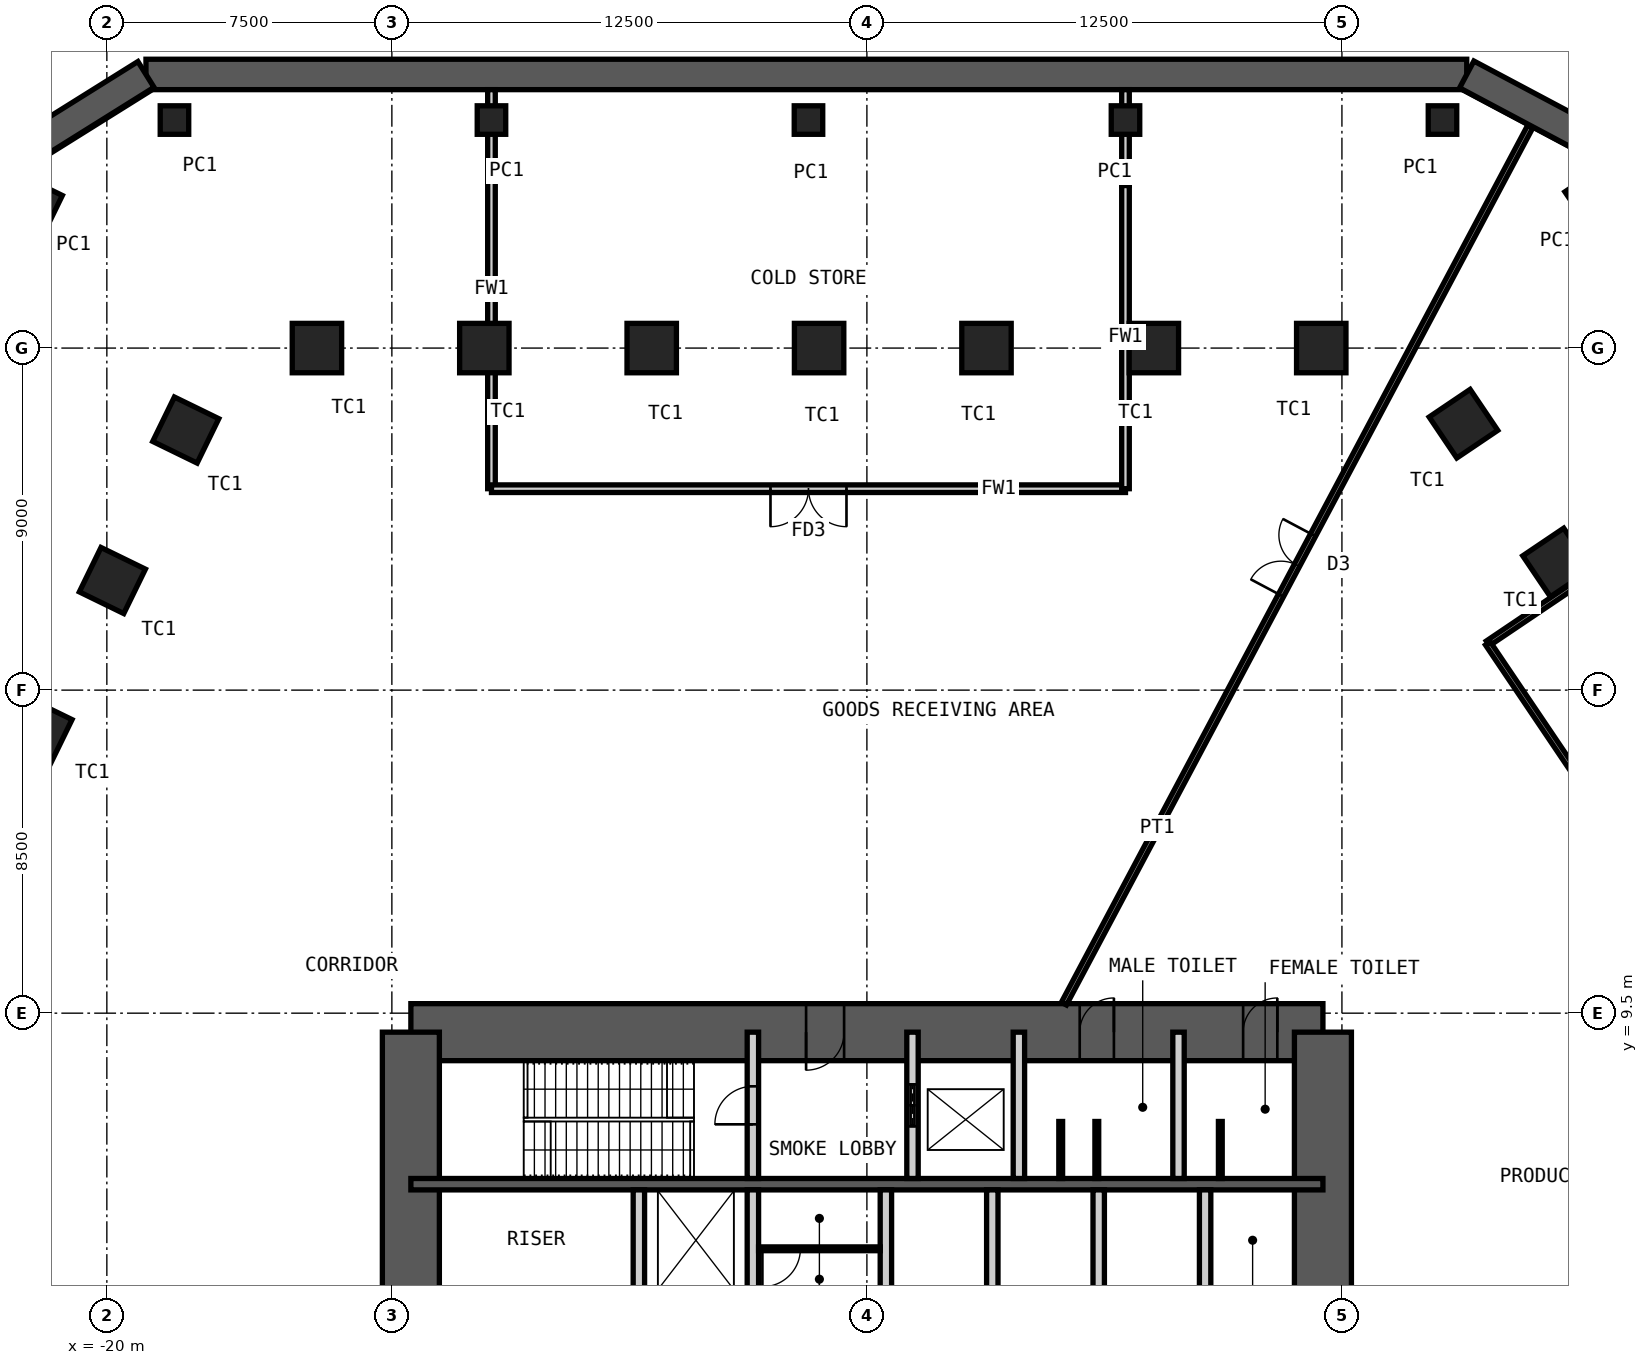
"""IFC4 building model, lengths in metres.
Left out: names, types, materials, properties, quantities, classifications, styles, units other than length and angle.
Written with IfcOpenShell. Run it as: python <this file> out.ifc"""

import sys

from ifc_helpers import new_model, si_unit, direction, frame, frame_2d, origin, origin_2d, place, context, subcontext, project, spatial, rectangle, hollow_rectangle, extrude, element, fill, save


model = new_model("IFC4")
c1 = context("Model", 3, precision=1e-05, world=origin(), true_north=direction((0.0, 1.0)))
c2 = subcontext(c1, "Body", "Model", "MODEL_VIEW")
j1 = project(units=[si_unit("LENGTHUNIT", "METRE"), si_unit("PLANEANGLEUNIT", "RADIAN")], contexts=[c1])
p1 = place(None, origin())
s1 = spatial("IfcSite", under=j1, at=p1, CompositionType="ELEMENT")
p2 = place(p1, origin())
s2 = spatial("IfcBuilding", under=s1, at=p2, CompositionType="ELEMENT")
p3 = place(p2, frame((0.0, 0.0, -6.0)))
s3 = spatial("IfcBuildingStorey", under=s2, at=p3, CompositionType="ELEMENT", Elevation=-6.0)
p4 = place(p3, frame((-18.97, 34.2, 0.0), z_axis=(0.0, 0.0, 1.0), x_axis=(1.0, 0.0, 0.0)))
e1 = element("IfcWall", 1, at=p4, inside=s3, PredefinedType="SHEAR", context=c2, shape_type="SweptSolid", body=[
    extrude(rectangle(XDim=34.755, YDim=0.8, at=frame_2d((17.377, 0.0))), origin(), (0.0, 0.0, 1.0), 6.0),
])
p5 = place(p3, frame((15.784, 34.2, 0.0), z_axis=(0.0, 0.0, 1.0), x_axis=(0.882948599748, -0.469469669099, 0.0)))
e2 = element("IfcWall", 2, at=p5, inside=s3, PredefinedType="SHEAR", context=c2, shape_type="SweptSolid", body=[
    extrude(rectangle(XDim=4.238, YDim=0.8, at=frame_2d((2.119, 0.0))), origin(), (0.0, 0.0, 1.0), 6.0),
])
p6 = place(p3, frame((-22.423, 32.043, 0.0), z_axis=(0.0, 0.0, 1.0), x_axis=(0.848065686315, 0.529891113055, 0.0)))
e3 = element("IfcWall", 3, at=p6, inside=s3, PredefinedType="SHEAR", context=c2, shape_type="SweptSolid", body=[
    extrude(rectangle(XDim=4.071, YDim=0.8, at=frame_2d((2.035, 0.0))), origin(), (0.0, 0.0, 1.0), 6.0),
])
for number, where, z_axis, x_axis in (
    (4, (-14.471, 27.0, 0.0), (0.0, 0.0, 1.0), (-1.0, 0.0, 0.0)),
    (5, (-10.067, 27.0, 0.0), (0.0, 0.0, 1.0), (-1.0, 0.0, 0.0)),
    (6, (-5.662, 27.0, 0.0), (0.0, 0.0, 1.0), (-1.0, 0.0, 0.0)),
    (7, (-1.258, 27.0, 0.0), (0.0, 0.0, 1.0), (-1.0, 0.0, 0.0)),
    (8, (3.147, 27.0, 0.0), (0.0, 0.0, 1.0), (-1.0, 0.0, 0.0)),
    (9, (7.552, 27.0, 0.0), (0.0, 0.0, 1.0), (-1.0, 0.0, 0.0)),
    (10, (11.956, 27.0, 0.0), (0.0, 0.0, 1.0), (-1.0, 0.0, 0.0)),
    (11, (15.698, 25.01, 0.0), (0.0, 0.0, 1.0), (-0.559, 0.829, 0.0)),
    (12, (18.161, 21.359, 0.0), (0.0, 0.0, 1.0), (-0.559, 0.829, 0.0)),
    (13, (-21.785, 16.925, 0.0), (0.0, 0.0, 1.0), (-0.438, -0.899, 0.0)),
    (14, (-19.854, 20.884, 0.0), (0.0, 0.0, 1.0), (-0.438, -0.899, 0.0)),
    (15, (-17.924, 24.843, 0.0), (0.0, 0.0, 1.0), (-0.438, -0.899, 0.0)),
):
    element("IfcColumn", number, at=place(p3, frame(where, z_axis=z_axis, x_axis=x_axis)), inside=s3, PredefinedType="COLUMN", context=c2, shape_type="SweptSolid", body=[
        extrude(hollow_rectangle(XDim=1.3, YDim=1.3, WallThickness=0.1, at=origin_2d()), origin(), (0.0, 0.0, 1.0), 6.0),
    ])
for number, where, z_axis, x_axis in (
    (16, (-18.221, 33.0, 0.0), (0.0, 0.0, 1.0), (-1.0, 0.0, 0.0)),
    (17, (-9.879, 33.0, 0.0), (0.0, 0.0, 1.0), (-1.0, 0.0, 0.0)),
    (18, (-1.537, 33.0, 0.0), (0.0, 0.0, 1.0), (-1.0, 0.0, 0.0)),
    (19, (6.805, 33.0, 0.0), (0.0, 0.0, 1.0), (-1.0, 0.0, 0.0)),
    (20, (18.888, 31.01, 0.0), (0.0, 0.0, 1.0), (-0.559, 0.829, 0.0)),
    (21, (15.146, 33.0, 0.0), (0.0, 0.0, 1.0), (-1.0, 0.0, 0.0)),
    (22, (-21.673, 30.843, 0.0), (0.0, 0.0, 1.0), (-0.438, -0.899, 0.0)),
):
    element("IfcColumn", number, at=place(p3, frame(where, z_axis=z_axis, x_axis=x_axis)), inside=s3, PredefinedType="COLUMN", context=c2, shape_type="SweptSolid", body=[
        extrude(hollow_rectangle(XDim=0.75, YDim=0.75, WallThickness=0.036, at=origin_2d()), origin(), (0.0, 0.0, 1.0), 6.0),
    ])
p7 = place(p3, frame((-12.0, 9.0, 0.0), z_axis=(0.0, 0.0, 1.0), x_axis=(1.0, 0.0, 0.0)))
e23 = element("IfcWall", 23, at=p7, inside=s3, PredefinedType="SHEAR", context=c2, shape_type="SweptSolid", body=[
    extrude(rectangle(XDim=24.0, YDim=1.5, at=frame_2d((12.0, 0.0))), origin(), (0.0, 0.0, 1.0), 6.0),
])
p8 = place(p7, frame((10.4, 0.0, 0.0)))
e24 = element("IfcOpeningElement", 24, at=p8, cuts=e23, PredefinedType="OPENING", context=c2, shape_type="SweptSolid", body=[
    extrude(rectangle(XDim=1.0, YDim=2.1, at=frame_2d((0.5, 1.05))), frame((0.0, 0.76, 0.0), z_axis=(0.0, -1.0, 0.0), x_axis=(1.0, 0.0, 0.0)), (0.0, 0.0, 1.0), 1.52),
])
p9 = place(p7, frame((17.6, 0.0, 0.0)))
e25 = element("IfcOpeningElement", 25, at=p9, cuts=e23, PredefinedType="OPENING", context=c2, shape_type="SweptSolid", body=[
    extrude(rectangle(XDim=0.9, YDim=2.1, at=frame_2d((0.45, 1.05))), frame((0.0, 0.76, 0.0), z_axis=(0.0, -1.0, 0.0), x_axis=(1.0, 0.0, 0.0)), (0.0, 0.0, 1.0), 1.52),
])
p10 = place(p7, frame((21.9, 0.0, 0.0)))
e26 = element("IfcOpeningElement", 26, at=p10, cuts=e23, PredefinedType="OPENING", context=c2, shape_type="SweptSolid", body=[
    extrude(rectangle(XDim=0.9, YDim=2.1, at=frame_2d((0.45, 1.05))), frame((0.0, 0.76, 0.0), z_axis=(0.0, -1.0, 0.0), x_axis=(1.0, 0.0, 0.0)), (0.0, 0.0, 1.0), 1.52),
])
p11 = place(p3, frame((12.0, -9.0, 0.0), z_axis=(0.0, 0.0, 1.0), x_axis=(0.0, 1.0, 0.0)))
e27 = element("IfcWall", 27, at=p11, inside=s3, PredefinedType="SHEAR", context=c2, shape_type="SweptSolid", body=[
    extrude(rectangle(XDim=18.0, YDim=1.5, at=frame_2d((9.0, 0.0))), origin(), (0.0, 0.0, 1.0), 6.0),
])
p12 = place(p11, frame((8.1, 0.0, 0.0)))
e28 = element("IfcOpeningElement", 28, at=p12, cuts=e27, PredefinedType="OPENING", context=c2, shape_type="SweptSolid", body=[
    extrude(rectangle(XDim=1.8, YDim=2.1, at=frame_2d((0.9, 1.05))), frame((0.0, 0.76, 0.0), z_axis=(0.0, -1.0, 0.0), x_axis=(1.0, 0.0, 0.0)), (0.0, 0.0, 1.0), 1.52),
])
p13 = place(p3, frame((-12.0, -9.0, 0.0), z_axis=(0.0, 0.0, 1.0), x_axis=(0.0, 1.0, 0.0)))
e29 = element("IfcWall", 29, at=p13, inside=s3, PredefinedType="SHEAR", context=c2, shape_type="SweptSolid", body=[
    extrude(rectangle(XDim=18.0, YDim=1.5, at=frame_2d((9.0, 0.0))), origin(), (0.0, 0.0, 1.0), 6.0),
])
p14 = place(p13, frame((8.1, 0.0, 0.0)))
e30 = element("IfcOpeningElement", 30, at=p14, cuts=e29, PredefinedType="OPENING", context=c2, shape_type="SweptSolid", body=[
    extrude(rectangle(XDim=1.8, YDim=2.1, at=frame_2d((0.9, 1.05))), frame((0.0, 0.76, 0.0), z_axis=(0.0, -1.0, 0.0), x_axis=(1.0, 0.0, 0.0)), (0.0, 0.0, 1.0), 1.52),
])
p15 = place(p3, frame((-12.0, 5.0, 0.0), z_axis=(0.0, 0.0, 1.0), x_axis=(1.0, 0.0, 0.0)))
e31 = element("IfcWall", 31, at=p15, inside=s3, PredefinedType="SHEAR", context=c2, shape_type="SweptSolid", body=[
    extrude(rectangle(XDim=24.0, YDim=0.3, at=frame_2d((12.0, 0.0))), origin(), (0.0, 0.0, 1.0), 6.0),
])
p16 = place(p3, frame((-3.0, 5.15, 0.0), z_axis=(0.0, 0.0, 1.0), x_axis=(0.0, 1.0, 0.0)))
e32 = element("IfcWall", 32, at=p16, inside=s3, PredefinedType="PARTITIONING", context=c2, shape_type="SweptSolid", body=[
    extrude(rectangle(XDim=3.85, YDim=0.3, at=frame_2d((1.925, 0.0))), origin(), (0.0, 0.0, 1.0), 5.78),
])
p17 = place(p16, frame((1.425, 0.0, 0.0)))
e33 = element("IfcOpeningElement", 33, at=p17, cuts=e32, PredefinedType="OPENING", context=c2, shape_type="SweptSolid", body=[
    extrude(rectangle(XDim=1.0, YDim=2.1, at=frame_2d((0.5, 1.05))), frame((0.0, 0.16, 0.0), z_axis=(0.0, -1.0, 0.0), x_axis=(1.0, 0.0, 0.0)), (0.0, 0.0, 1.0), 0.32),
])
p18 = place(p3, frame((1.2, 5.15, 0.0), z_axis=(0.0, 0.0, 1.0), x_axis=(0.0, 1.0, 0.0)))
e34 = element("IfcWall", 34, at=p18, inside=s3, PredefinedType="PARTITIONING", context=c2, shape_type="SweptSolid", body=[
    extrude(rectangle(XDim=3.85, YDim=0.3, at=frame_2d((1.925, 0.0))), origin(), (0.0, 0.0, 1.0), 5.78),
])
p19 = place(p18, frame((1.375, 0.0, 0.0)))
e35 = element("IfcOpeningElement", 35, at=p19, cuts=e34, PredefinedType="OPENING", context=c2, shape_type="SweptSolid", body=[
    extrude(rectangle(XDim=1.1, YDim=2.4, at=frame_2d((0.55, 1.2))), frame((0.0, 0.16, 0.0), z_axis=(0.0, -1.0, 0.0), x_axis=(1.0, 0.0, 0.0)), (0.0, 0.0, 1.0), 0.32),
])
for number, where, z_axis, x_axis in (
    (36, (4.0, 5.15, 0.0), (0.0, 0.0, 1.0), (0.0, 1.0, 0.0)),
    (37, (8.2, 5.15, 0.0), (0.0, 0.0, 1.0), (0.0, 1.0, 0.0)),
):
    element("IfcWall", number, at=place(p3, frame(where, z_axis=z_axis, x_axis=x_axis)), inside=s3, PredefinedType="PARTITIONING", context=c2, shape_type="SweptSolid", body=[
        extrude(rectangle(XDim=3.85, YDim=0.3, at=frame_2d((1.925, 0.0))), origin(), (0.0, 0.0, 1.0), 5.78),
    ])
for number, where, z_axis, x_axis in (
    (38, (-6.0, 2.2, 0.0), (0.0, 0.0, 1.0), (0.0, 1.0, 0.0)),
    (39, (-3.0, 2.2, 0.0), (0.0, 0.0, 1.0), (0.0, 1.0, 0.0)),
    (40, (0.5, 2.2, 0.0), (0.0, 0.0, 1.0), (0.0, 1.0, 0.0)),
    (41, (3.3, 2.2, 0.0), (0.0, 0.0, 1.0), (0.0, 1.0, 0.0)),
    (42, (6.1, 2.2, 0.0), (0.0, 0.0, 1.0), (0.0, 1.0, 0.0)),
    (43, (8.9, 2.2, 0.0), (0.0, 0.0, 1.0), (0.0, 1.0, 0.0)),
):
    element("IfcWall", number, at=place(p3, frame(where, z_axis=z_axis, x_axis=x_axis)), inside=s3, PredefinedType="PARTITIONING", context=c2, shape_type="SweptSolid", body=[
        extrude(rectangle(XDim=2.65, YDim=0.3, at=frame_2d((1.325, 0.0))), origin(), (0.0, 0.0, 1.0), 5.78),
    ])
p20 = place(p3, frame((-2.85, 3.3, 0.0), z_axis=(0.0, 0.0, 1.0), x_axis=(1.0, 0.0, 0.0)))
e44 = element("IfcWall", 44, at=p20, inside=s3, PredefinedType="PARTITIONING", context=c2, shape_type="SweptSolid", body=[
    extrude(rectangle(XDim=3.2, YDim=0.1, at=frame_2d((1.6, 0.0))), origin(), (0.0, 0.0, 1.0), 5.78),
])
p21 = place(p20, frame((0.1, 0.0, 0.0)))
e45 = element("IfcOpeningElement", 45, at=p21, cuts=e44, PredefinedType="OPENING", context=c2, shape_type="SweptSolid", body=[
    extrude(rectangle(XDim=1.0, YDim=2.4, at=frame_2d((0.5, 1.2))), frame((0.0, 0.06, 0.0), z_axis=(0.0, -1.0, 0.0), x_axis=(1.0, 0.0, 0.0)), (0.0, 0.0, 1.0), 0.12),
])
for number, where, z_axis, x_axis in (
    (46, (5.1, 5.15, 0.0), (0.0, 0.0, 1.0), (0.0, 1.0, 0.0)),
    (47, (6.05, 5.15, 0.0), (0.0, 0.0, 1.0), (0.0, 1.0, 0.0)),
    (48, (9.3, 5.15, 0.0), (0.0, 0.0, 1.0), (0.0, 1.0, 0.0)),
):
    element("IfcWall", number, at=place(p3, frame(where, z_axis=z_axis, x_axis=x_axis)), inside=s3, PredefinedType="PARTITIONING", context=c2, shape_type="SweptSolid", body=[
        extrude(rectangle(XDim=1.5, YDim=0.1, at=frame_2d((0.75, 0.0))), origin(), (0.0, 0.0, 1.0), 2.1),
    ])
p22 = place(p3, frame((-9.879, 33.8, 0.0), z_axis=(0.0, 0.0, 1.0), x_axis=(0.0, -1.0, 0.0)))
e49 = element("IfcWall", 49, at=p22, inside=s3, PredefinedType="PARTITIONING", context=c2, shape_type="SweptSolid", body=[
    extrude(rectangle(XDim=10.5, YDim=0.2, at=frame_2d((5.25, 0.0))), origin(), (0.0, 0.0, 1.0), 5.75),
])
p23 = place(p3, frame((6.805, 33.8, 0.0), z_axis=(0.0, 0.0, 1.0), x_axis=(0.0, -1.0, 0.0)))
e50 = element("IfcWall", 50, at=p23, inside=s3, PredefinedType="PARTITIONING", context=c2, shape_type="SweptSolid", body=[
    extrude(rectangle(XDim=0.78, YDim=0.2, at=frame_2d((0.39, 0.0))), origin(), (0.0, 0.0, 1.0), 5.75),
])
p24 = place(p3, frame((-9.879, 23.3, 0.0), z_axis=(0.0, 0.0, 1.0), x_axis=(1.0, 0.0, 0.0)))
e51 = element("IfcWall", 51, at=p24, inside=s3, PredefinedType="PARTITIONING", context=c2, shape_type="SweptSolid", body=[
    extrude(rectangle(XDim=16.684, YDim=0.2, at=frame_2d((8.342, 0.0))), origin(), (0.0, 0.0, 1.0), 5.75),
])
p25 = place(p24, frame((7.342, 0.0, 0.0)))
e52 = element("IfcOpeningElement", 52, at=p25, cuts=e51, PredefinedType="OPENING", context=c2, shape_type="SweptSolid", body=[
    extrude(rectangle(XDim=2.0, YDim=2.4, at=frame_2d((1.0, 1.2))), frame((0.0, 0.11, 0.0), z_axis=(0.0, -1.0, 0.0), x_axis=(1.0, 0.0, 0.0)), (0.0, 0.0, 1.0), 0.22),
])
p26 = place(p3, frame((24.216, 24.542, 0.0), z_axis=(0.0, 0.0, 1.0), x_axis=(-0.829037218051, -0.559193429045, 0.0)))
e53 = element("IfcWall", 53, at=p26, inside=s3, PredefinedType="PARTITIONING", context=c2, shape_type="SweptSolid", body=[
    extrude(rectangle(XDim=9.5, YDim=0.15, at=frame_2d((4.75, 0.0))), origin(), (0.0, 0.0, 1.0), 4.65),
])
p27 = place(p3, frame((16.341, 19.23, 0.0), z_axis=(0.0, 0.0, 1.0), x_axis=(0.559193597406, -0.829037104489, 0.0)))
e54 = element("IfcWall", 54, at=p27, inside=s3, PredefinedType="PARTITIONING", context=c2, shape_type="SweptSolid", body=[
    extrude(rectangle(XDim=16.684, YDim=0.15, at=frame_2d((8.342, 0.0))), origin(), (0.0, 0.0, 1.0), 5.75),
])
p28 = place(p27, frame((7.442, 0.0, 0.0)))
e55 = element("IfcOpeningElement", 55, at=p28, cuts=e54, PredefinedType="OPENING", context=c2, shape_type="SweptSolid", body=[
    extrude(rectangle(XDim=1.8, YDim=2.4, at=frame_2d((0.9, 1.2))), frame((0.0, 0.085, 0.0), z_axis=(0.0, -1.0, 0.0), x_axis=(1.0, 0.0, 0.0)), (0.0, 0.0, 1.0), 0.17),
])
p29 = place(p3, frame((5.184, 9.75, 0.0), z_axis=(0.0, 0.0, 1.0), x_axis=(0.469471208528, 0.882947781221, 0.0)))
e56 = element("IfcWall", 56, at=p29, inside=s3, PredefinedType="PARTITIONING", context=c2, shape_type="SweptSolid", body=[
    extrude(rectangle(XDim=26.134, YDim=0.15, at=frame_2d((13.067, 0.0))), origin(), (0.0, 0.0, 1.0), 5.75),
])
p30 = place(p29, frame((12.167, 0.0, 0.0)))
e57 = element("IfcOpeningElement", 57, at=p30, cuts=e56, PredefinedType="OPENING", context=c2, shape_type="SweptSolid", body=[
    extrude(rectangle(XDim=1.8, YDim=2.4, at=frame_2d((0.9, 1.2))), frame((0.0, 0.085, 0.0), z_axis=(0.0, -1.0, 0.0), x_axis=(1.0, 0.0, 0.0)), (0.0, 0.0, 1.0), 0.17),
])
p31 = place(p3, frame((6.805, 33.021, 0.0), z_axis=(0.0, 0.0, 1.0), x_axis=(0.0, -1.0, 0.0)))
e58 = element("IfcWall", 58, at=p31, inside=s3, PredefinedType="PARTITIONING", context=c2, shape_type="SweptSolid", body=[
    extrude(rectangle(XDim=1.743, YDim=0.2, at=frame_2d((0.872, 0.0))), origin(), (0.0, 0.0, 1.0), 4.65),
])
p32 = place(p3, frame((6.805, 31.277, 0.0), z_axis=(0.0, 0.0, 1.0), x_axis=(0.0, -1.0, 0.0)))
e59 = element("IfcWall", 59, at=p32, inside=s3, PredefinedType="PARTITIONING", context=c2, shape_type="SweptSolid", body=[
    extrude(rectangle(XDim=7.977, YDim=0.2, at=frame_2d((3.989, 0.0))), origin(), (0.0, 0.0, 1.0), 5.75),
])
p33 = place(p8, origin())
e60 = element("IfcDoor", 60, at=p33, inside=s3, OperationType="SINGLE_SWING_LEFT", PredefinedType="DOOR", context=c2, shape_type="SweptSolid", body=[
    extrude(rectangle(XDim=1.0, YDim=2.1, at=frame_2d((0.5, 1.05))), frame((0.0, 0.025, 0.0), z_axis=(0.0, -1.0, 0.0), x_axis=(1.0, 0.0, 0.0)), (0.0, 0.0, 1.0), 0.05),
])
fill(e24, e60)
p34 = place(p9, origin())
e61 = element("IfcDoor", 61, at=p34, inside=s3, OperationType="SINGLE_SWING_LEFT", PredefinedType="DOOR", context=c2, shape_type="SweptSolid", body=[
    extrude(rectangle(XDim=0.9, YDim=2.1, at=frame_2d((0.45, 1.05))), frame((0.0, 0.025, 0.0), z_axis=(0.0, -1.0, 0.0), x_axis=(1.0, 0.0, 0.0)), (0.0, 0.0, 1.0), 0.05),
])
fill(e25, e61)
p35 = place(p10, origin())
e62 = element("IfcDoor", 62, at=p35, inside=s3, OperationType="SINGLE_SWING_LEFT", PredefinedType="DOOR", context=c2, shape_type="SweptSolid", body=[
    extrude(rectangle(XDim=0.9, YDim=2.1, at=frame_2d((0.45, 1.05))), frame((0.0, 0.025, 0.0), z_axis=(0.0, -1.0, 0.0), x_axis=(1.0, 0.0, 0.0)), (0.0, 0.0, 1.0), 0.05),
])
fill(e26, e62)
p36 = place(p17, origin())
e63 = element("IfcDoor", 63, at=p36, inside=s3, OperationType="SINGLE_SWING_RIGHT", PredefinedType="DOOR", context=c2, shape_type="SweptSolid", body=[
    extrude(rectangle(XDim=1.0, YDim=2.1, at=frame_2d((0.5, 1.05))), frame((0.0, 0.025, 0.0), z_axis=(0.0, -1.0, 0.0), x_axis=(1.0, 0.0, 0.0)), (0.0, 0.0, 1.0), 0.05),
])
fill(e33, e63)
p37 = place(p19, origin())
e64 = element("IfcDoor", 64, at=p37, inside=s3, OperationType="DOUBLE_DOOR_SLIDING", PredefinedType="DOOR", context=c2, shape_type="SweptSolid", body=[
    extrude(rectangle(XDim=1.1, YDim=2.4, at=frame_2d((0.55, 1.2))), frame((0.0, 0.025, 0.0), z_axis=(0.0, -1.0, 0.0), x_axis=(1.0, 0.0, 0.0)), (0.0, 0.0, 1.0), 0.05),
])
fill(e35, e64)
p38 = place(p21, origin())
e65 = element("IfcDoor", 65, at=p38, inside=s3, OperationType="SINGLE_SWING_LEFT", PredefinedType="DOOR", context=c2, shape_type="SweptSolid", body=[
    extrude(rectangle(XDim=1.0, YDim=2.4, at=frame_2d((0.5, 1.2))), frame((0.0, 0.025, 0.0), z_axis=(0.0, -1.0, 0.0), x_axis=(1.0, 0.0, 0.0)), (0.0, 0.0, 1.0), 0.05),
])
fill(e45, e65)
p39 = place(p25, origin())
e66 = element("IfcDoor", 66, at=p39, inside=s3, OperationType="DOUBLE_DOOR_DOUBLE_SWING", PredefinedType="DOOR", context=c2, shape_type="SweptSolid", body=[
    extrude(rectangle(XDim=2.0, YDim=2.4, at=frame_2d((1.0, 1.2))), frame((0.0, 0.025, 0.0), z_axis=(0.0, -1.0, 0.0), x_axis=(1.0, 0.0, 0.0)), (0.0, 0.0, 1.0), 0.05),
])
fill(e52, e66)
p40 = place(p30, origin())
e67 = element("IfcDoor", 67, at=p40, inside=s3, OperationType="DOUBLE_DOOR_DOUBLE_SWING", PredefinedType="DOOR", context=c2, shape_type="SweptSolid", body=[
    extrude(rectangle(XDim=1.8, YDim=2.4, at=frame_2d((0.9, 1.2))), frame((0.0, 0.025, 0.0), z_axis=(0.0, -1.0, 0.0), x_axis=(1.0, 0.0, 0.0)), (0.0, 0.0, 1.0), 0.05),
])
fill(e57, e67)
save(model, sys.argv[1])
